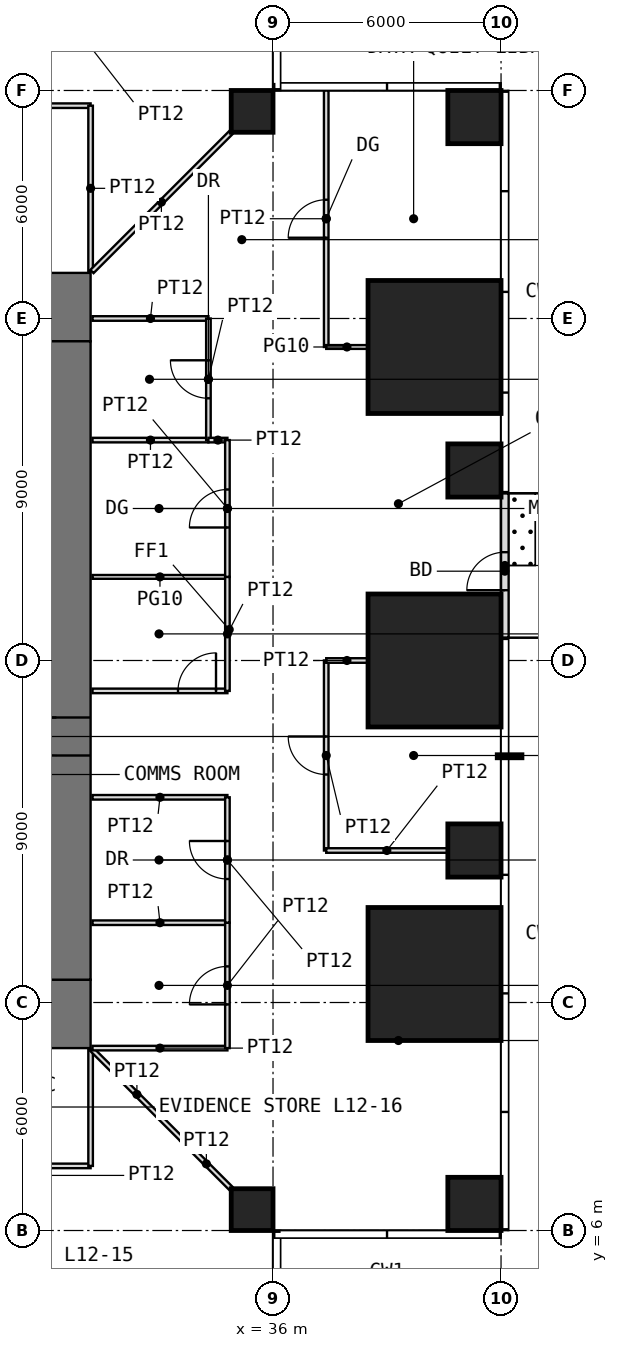
"""IFC4 building model, lengths in metres.
Left out: names, types, materials, properties, quantities, classifications, styles, units other than length and angle.
Written with IfcOpenShell. Run it as: python <this file> out.ifc"""

import sys

from ifc_helpers import new_model, si_unit, direction, frame, frame_2d, origin, origin_2d, place, context, subcontext, project, spatial, rectangle, extrude, element, fill, save


model = new_model("IFC4")
c1 = context("Model", 3, precision=1e-05, world=origin(), true_north=direction((0.0, 1.0)))
c2 = subcontext(c1, "Body", "Model", "MODEL_VIEW")
j1 = project(units=[si_unit("LENGTHUNIT", "METRE"), si_unit("PLANEANGLEUNIT", "RADIAN")], contexts=[c1])
p1 = place(None, origin())
s1 = spatial("IfcSite", under=j1, at=p1, CompositionType="ELEMENT")
p2 = place(p1, origin())
s2 = spatial("IfcBuilding", under=s1, at=p2, CompositionType="ELEMENT")
p3 = place(p2, frame((0.0, 0.0, 54.5)))
s3 = spatial("IfcBuildingStorey", under=s2, at=p3, CompositionType="ELEMENT", Elevation=54.5)
p4 = place(p3, frame((35.45, 6.55, 0.0), z_axis=(0.0, 0.0, 1.0), x_axis=(1.0, 0.0, 0.0)))
e1 = element("IfcColumn", 1, at=p4, inside=s3, PredefinedType="COLUMN", context=c2, shape_type="SweptSolid", body=[
    extrude(rectangle(XDim=1.1, YDim=1.1, at=origin_2d()), origin(), (0.0, 0.0, 1.0), 4.0),
])
p5 = place(p3, frame((41.3, 6.7, 0.0), z_axis=(0.0, 0.0, 1.0), x_axis=(1.0, 0.0, 0.0)))
e2 = element("IfcColumn", 2, at=p5, inside=s3, PredefinedType="COLUMN", context=c2, shape_type="SweptSolid", body=[
    extrude(rectangle(XDim=1.4, YDim=1.4, at=origin_2d()), origin(), (0.0, 0.0, 1.0), 4.0),
])
p6 = place(p3, frame((40.25, 12.75, 0.0), z_axis=(0.0, 0.0, 1.0), x_axis=(1.0, 0.0, 0.0)))
e3 = element("IfcColumn", 3, at=p6, inside=s3, PredefinedType="COLUMN", context=c2, shape_type="SweptSolid", body=[
    extrude(rectangle(XDim=3.5, YDim=3.5, at=origin_2d()), origin(), (0.0, 0.0, 1.0), 4.0),
])
p7 = place(p3, frame((41.3, 16.0, 0.0), z_axis=(0.0, 0.0, 1.0), x_axis=(1.0, 0.0, 0.0)))
e4 = element("IfcColumn", 4, at=p7, inside=s3, PredefinedType="COLUMN", context=c2, shape_type="SweptSolid", body=[
    extrude(rectangle(XDim=1.4, YDim=1.4, at=origin_2d()), origin(), (0.0, 0.0, 1.0), 4.0),
])
p8 = place(p3, frame((40.25, 21.0, 0.0), z_axis=(0.0, 0.0, 1.0), x_axis=(1.0, 0.0, 0.0)))
e5 = element("IfcColumn", 5, at=p8, inside=s3, PredefinedType="COLUMN", context=c2, shape_type="SweptSolid", body=[
    extrude(rectangle(XDim=3.5, YDim=3.5, at=origin_2d()), origin(), (0.0, 0.0, 1.0), 4.0),
])
p9 = place(p3, frame((41.3, 26.0, 0.0), z_axis=(0.0, 0.0, 1.0), x_axis=(1.0, 0.0, 0.0)))
e6 = element("IfcColumn", 6, at=p9, inside=s3, PredefinedType="COLUMN", context=c2, shape_type="SweptSolid", body=[
    extrude(rectangle(XDim=1.4, YDim=1.4, at=origin_2d()), origin(), (0.0, 0.0, 1.0), 4.0),
])
p10 = place(p3, frame((40.25, 29.25, 0.0), z_axis=(0.0, 0.0, 1.0), x_axis=(1.0, 0.0, 0.0)))
e7 = element("IfcColumn", 7, at=p10, inside=s3, PredefinedType="COLUMN", context=c2, shape_type="SweptSolid", body=[
    extrude(rectangle(XDim=3.5, YDim=3.5, at=origin_2d()), origin(), (0.0, 0.0, 1.0), 4.0),
])
p11 = place(p3, frame((35.45, 35.45, 0.0), z_axis=(0.0, 0.0, 1.0), x_axis=(1.0, 0.0, 0.0)))
e8 = element("IfcColumn", 8, at=p11, inside=s3, PredefinedType="COLUMN", context=c2, shape_type="SweptSolid", body=[
    extrude(rectangle(XDim=1.1, YDim=1.1, at=origin_2d()), origin(), (0.0, 0.0, 1.0), 4.0),
])
p12 = place(p3, frame((41.3, 35.3, 0.0), z_axis=(0.0, 0.0, 1.0), x_axis=(1.0, 0.0, 0.0)))
e9 = element("IfcColumn", 9, at=p12, inside=s3, PredefinedType="COLUMN", context=c2, shape_type="SweptSolid", body=[
    extrude(rectangle(XDim=1.4, YDim=1.4, at=origin_2d()), origin(), (0.0, 0.0, 1.0), 4.0),
])
p13 = place(p3, frame((42.1, 21.6, 0.0), z_axis=(0.0, 0.0, 1.0), x_axis=(0.0, 1.0, 0.0)))
e10 = element("IfcWall", 10, at=p13, inside=s3, PredefinedType="USERDEFINED", context=c2, shape_type="SweptSolid", body=[
    extrude(rectangle(XDim=3.8, YDim=0.2, at=frame_2d((1.9, 0.0))), origin(), (0.0, 0.0, 1.0), 3.75),
])
p14 = place(p13, frame((1.25, 0.0, 0.0)))
e11 = element("IfcOpeningElement", 11, at=p14, cuts=e10, PredefinedType="OPENING", context=c2, shape_type="SweptSolid", body=[
    extrude(rectangle(XDim=1.0, YDim=2.4, at=frame_2d((0.5, 1.2))), frame((0.0, 0.11, 0.0), z_axis=(0.0, -1.0, 0.0), x_axis=(1.0, 0.0, 0.0)), (0.0, 0.0, 1.0), 0.22),
])
p15 = place(p3, frame((10.8, 11.7, -0.05), z_axis=(0.0, 0.0, 1.0), x_axis=(1.0, 0.0, 0.0)))
e12 = element("IfcWall", 12, at=p15, inside=s3, PredefinedType="SHEAR", context=c2, shape_type="SweptSolid", body=[
    extrude(rectangle(XDim=20.4, YDim=1.8, at=frame_2d((10.2, 0.0))), origin(), (0.0, 0.0, 1.0), 4.0),
])
p16 = place(p15, frame((9.2, 0.0, 0.05)))
e13 = element("IfcOpeningElement", 13, at=p16, cuts=e12, PredefinedType="OPENING", context=c2, shape_type="SweptSolid", body=[
    extrude(rectangle(XDim=2.0, YDim=2.2, at=frame_2d((1.0, 1.1))), frame((0.0, 0.91, 0.0), z_axis=(0.0, -1.0, 0.0), x_axis=(1.0, 0.0, 0.0)), (0.0, 0.0, 1.0), 1.82),
])
p17 = place(p3, frame((10.8, 30.3, -0.05), z_axis=(0.0, 0.0, 1.0), x_axis=(1.0, 0.0, 0.0)))
e14 = element("IfcWall", 14, at=p17, inside=s3, PredefinedType="SHEAR", context=c2, shape_type="SweptSolid", body=[
    extrude(rectangle(XDim=20.4, YDim=1.8, at=frame_2d((10.2, 0.0))), origin(), (0.0, 0.0, 1.0), 4.0),
])
p18 = place(p17, frame((9.2, 0.0, 0.05)))
e15 = element("IfcOpeningElement", 15, at=p18, cuts=e14, PredefinedType="OPENING", context=c2, shape_type="SweptSolid", body=[
    extrude(rectangle(XDim=2.0, YDim=2.2, at=frame_2d((1.0, 1.1))), frame((0.0, 0.91, 0.0), z_axis=(0.0, -1.0, 0.0), x_axis=(1.0, 0.0, 0.0)), (0.0, 0.0, 1.0), 1.82),
])
p19 = place(p3, frame((30.3, 12.6, -0.05), z_axis=(0.0, 0.0, 1.0), x_axis=(0.0, 1.0, 0.0)))
e16 = element("IfcWall", 16, at=p19, inside=s3, PredefinedType="SHEAR", context=c2, shape_type="SweptSolid", body=[
    extrude(rectangle(XDim=16.8, YDim=1.8, at=frame_2d((8.4, 0.0))), origin(), (0.0, 0.0, 1.0), 4.0),
])
p20 = place(p19, frame((5.9, 0.0, 0.05)))
e17 = element("IfcOpeningElement", 17, at=p20, cuts=e16, PredefinedType="OPENING", context=c2, shape_type="SweptSolid", body=[
    extrude(rectangle(XDim=1.0, YDim=2.2, at=frame_2d((0.5, 1.1))), frame((0.0, 0.91, 0.0), z_axis=(0.0, -1.0, 0.0), x_axis=(1.0, 0.0, 0.0)), (0.0, 0.0, 1.0), 1.82),
])
p21 = place(p3, frame((23.6, 35.6, 0.0), z_axis=(0.0, 0.0, 1.0), x_axis=(1.0, 0.0, 0.0)))
e18 = element("IfcWall", 18, at=p21, inside=s3, PredefinedType="PARTITIONING", context=c2, shape_type="SweptSolid", body=[
    extrude(rectangle(XDim=7.6, YDim=0.12, at=frame_2d((3.8, 0.0))), origin(), (0.0, 0.0, 1.0), 3.75),
])
p22 = place(p21, frame((3.3, 0.0, 0.0)))
e19 = element("IfcOpeningElement", 19, at=p22, cuts=e18, PredefinedType="OPENING", context=c2, shape_type="SweptSolid", body=[
    extrude(rectangle(XDim=1.0, YDim=2.4, at=frame_2d((0.5, 1.2))), frame((0.0, 0.07, 0.0), z_axis=(0.0, -1.0, 0.0), x_axis=(1.0, 0.0, 0.0)), (0.0, 0.0, 1.0), 0.14),
])
p23 = place(p3, frame((27.6, 7.7, 0.0), z_axis=(0.0, 0.0, 1.0), x_axis=(1.0, 0.0, 0.0)))
e20 = element("IfcWall", 20, at=p23, inside=s3, PredefinedType="PARTITIONING", context=c2, shape_type="SweptSolid", body=[
    extrude(rectangle(XDim=3.6, YDim=0.12, at=frame_2d((1.8, 0.0))), origin(), (0.0, 0.0, 1.0), 3.75),
])
p24 = place(p23, frame((1.3, 0.0, 0.0)))
e21 = element("IfcOpeningElement", 21, at=p24, cuts=e20, PredefinedType="OPENING", context=c2, shape_type="SweptSolid", body=[
    extrude(rectangle(XDim=1.0, YDim=2.2, at=frame_2d((0.5, 1.1))), frame((0.0, 0.07, 0.0), z_axis=(0.0, -1.0, 0.0), x_axis=(1.0, 0.0, 0.0)), (0.0, 0.0, 1.0), 0.14),
])
p25 = place(p3, frame((31.2, 7.7, 0.0), z_axis=(0.0, 0.0, 1.0), x_axis=(0.0, 1.0, 0.0)))
e22 = element("IfcWall", 22, at=p25, inside=s3, PredefinedType="PARTITIONING", context=c2, shape_type="SweptSolid", body=[
    extrude(rectangle(XDim=3.05, YDim=0.12, at=frame_2d((1.525, 0.0))), origin(), (0.0, 0.0, 1.0), 3.75),
])
p26 = place(p3, frame((31.2, 31.25, 0.0), z_axis=(0.0, 0.0, 1.0), x_axis=(0.0, 1.0, 0.0)))
e23 = element("IfcWall", 23, at=p26, inside=s3, PredefinedType="PARTITIONING", context=c2, shape_type="SweptSolid", body=[
    extrude(rectangle(XDim=4.35, YDim=0.12, at=frame_2d((2.175, 0.0))), origin(), (0.0, 0.0, 1.0), 3.75),
])
p27 = place(p3, frame((31.235, 10.765, 0.0), z_axis=(0.0, 0.0, 1.0), x_axis=(0.707106781187, -0.707106781187, 0.0)))
e24 = element("IfcWall", 24, at=p27, inside=s3, PredefinedType="PARTITIONING", context=c2, shape_type="SweptSolid", body=[
    extrude(rectangle(XDim=3.346, YDim=0.12, at=frame_2d((1.673, 0.0))), origin(), (0.0, 0.0, 1.0), 3.75),
])
p28 = place(p3, frame((31.235, 31.235, 0.0), z_axis=(0.0, 0.0, 1.0), x_axis=(0.707106781187, 0.707106781187, 0.0)))
e25 = element("IfcWall", 25, at=p28, inside=s3, PredefinedType="PARTITIONING", context=c2, shape_type="SweptSolid", body=[
    extrude(rectangle(XDim=5.168, YDim=0.12, at=frame_2d((2.584, 0.0))), origin(), (0.0, 0.0, 1.0), 3.75),
])
for number, where, z_axis, x_axis in (
    (26, (31.25, 10.8, 0.0), (0.0, 0.0, 1.0), (1.0, 0.0, 0.0)),
    (27, (31.25, 14.1, 0.0), (0.0, 0.0, 1.0), (1.0, 0.0, 0.0)),
    (28, (31.25, 17.4, 0.0), (0.0, 0.0, 1.0), (1.0, 0.0, 0.0)),
):
    element("IfcWall", number, at=place(p3, frame(where, z_axis=z_axis, x_axis=x_axis)), inside=s3, PredefinedType="PARTITIONING", context=c2, shape_type="SweptSolid", body=[
        extrude(rectangle(XDim=3.55, YDim=0.12, at=frame_2d((1.775, 0.0))), origin(), (0.0, 0.0, 1.0), 3.75),
    ])
p29 = place(p3, frame((31.25, 20.2, 0.0), z_axis=(0.0, 0.0, 1.0), x_axis=(1.0, 0.0, 0.0)))
e29 = element("IfcWall", 29, at=p29, inside=s3, PredefinedType="PARTITIONING", context=c2, shape_type="SweptSolid", body=[
    extrude(rectangle(XDim=3.55, YDim=0.12, at=frame_2d((1.775, 0.0))), origin(), (0.0, 0.0, 1.0), 3.75),
])
p30 = place(p29, frame((2.25, 0.0, 0.0)))
e30 = element("IfcOpeningElement", 30, at=p30, cuts=e29, PredefinedType="OPENING", context=c2, shape_type="SweptSolid", body=[
    extrude(rectangle(XDim=1.0, YDim=2.4, at=frame_2d((0.5, 1.2))), frame((0.0, 0.07, 0.0), z_axis=(0.0, -1.0, 0.0), x_axis=(1.0, 0.0, 0.0)), (0.0, 0.0, 1.0), 0.14),
])
p31 = place(p3, frame((31.25, 23.2, 0.0), z_axis=(0.0, 0.0, 1.0), x_axis=(1.0, 0.0, 0.0)))
e31 = element("IfcWall", 31, at=p31, inside=s3, PredefinedType="PARTITIONING", context=c2, shape_type="SweptSolid", body=[
    extrude(rectangle(XDim=3.55, YDim=0.1, at=frame_2d((1.775, 0.0))), origin(), (0.0, 0.0, 1.0), 3.75),
])
for number, where, z_axis, x_axis in (
    (32, (31.25, 26.8, 0.0), (0.0, 0.0, 1.0), (1.0, 0.0, 0.0)),
    (33, (31.25, 30.0, 0.0), (0.0, 0.0, 1.0), (1.0, 0.0, 0.0)),
):
    element("IfcWall", number, at=place(p3, frame(where, z_axis=z_axis, x_axis=x_axis)), inside=s3, PredefinedType="PARTITIONING", context=c2, shape_type="SweptSolid", body=[
        extrude(rectangle(XDim=3.05, YDim=0.12, at=frame_2d((1.525, 0.0))), origin(), (0.0, 0.0, 1.0), 3.75),
    ])
p32 = place(p3, frame((33.602, 8.398, 0.0), z_axis=(0.0, 0.0, 1.0), x_axis=(0.707106781187, -0.707106781187, 0.0)))
e34 = element("IfcWall", 34, at=p32, inside=s3, PredefinedType="PARTITIONING", context=c2, shape_type="SweptSolid", body=[
    extrude(rectangle(XDim=1.822, YDim=0.12, at=frame_2d((0.911, 0.0))), origin(), (0.0, 0.0, 1.0), 3.75),
])
p33 = place(p3, frame((34.3, 26.8, 0.0), z_axis=(0.0, 0.0, 1.0), x_axis=(0.0, 1.0, 0.0)))
e35 = element("IfcWall", 35, at=p33, inside=s3, PredefinedType="PARTITIONING", context=c2, shape_type="SweptSolid", body=[
    extrude(rectangle(XDim=3.2, YDim=0.12, at=frame_2d((1.6, 0.0))), origin(), (0.0, 0.0, 1.0), 3.75),
])
p34 = place(p33, frame((1.1, 0.0, 0.0)))
e36 = element("IfcOpeningElement", 36, at=p34, cuts=e35, PredefinedType="OPENING", context=c2, shape_type="SweptSolid", body=[
    extrude(rectangle(XDim=1.0, YDim=2.2, at=frame_2d((0.5, 1.1))), frame((0.0, 0.07, 0.0), z_axis=(0.0, -1.0, 0.0), x_axis=(1.0, 0.0, 0.0)), (0.0, 0.0, 1.0), 0.14),
])
p35 = place(p3, frame((34.3, 26.8, 0.0), z_axis=(0.0, 0.0, 1.0), x_axis=(1.0, 0.0, 0.0)))
e37 = element("IfcWall", 37, at=p35, inside=s3, PredefinedType="PARTITIONING", context=c2, shape_type="SweptSolid", body=[
    extrude(rectangle(XDim=0.5, YDim=0.12, at=frame_2d((0.25, 0.0))), origin(), (0.0, 0.0, 1.0), 3.75),
])
p36 = place(p3, frame((34.8, 10.8, 0.0), z_axis=(0.0, 0.0, 1.0), x_axis=(0.0, 1.0, 0.0)))
e38 = element("IfcWall", 38, at=p36, inside=s3, PredefinedType="PARTITIONING", context=c2, shape_type="SweptSolid", body=[
    extrude(rectangle(XDim=3.3, YDim=0.12, at=frame_2d((1.65, 0.0))), origin(), (0.0, 0.0, 1.0), 3.75),
])
p37 = place(p36, frame((1.15, 0.0, 0.0)))
e39 = element("IfcOpeningElement", 39, at=p37, cuts=e38, PredefinedType="OPENING", context=c2, shape_type="SweptSolid", body=[
    extrude(rectangle(XDim=1.0, YDim=2.2, at=frame_2d((0.5, 1.1))), frame((0.0, 0.07, 0.0), z_axis=(0.0, -1.0, 0.0), x_axis=(1.0, 0.0, 0.0)), (0.0, 0.0, 1.0), 0.14),
])
p38 = place(p3, frame((34.8, 14.1, 0.0), z_axis=(0.0, 0.0, 1.0), x_axis=(0.0, 1.0, 0.0)))
e40 = element("IfcWall", 40, at=p38, inside=s3, PredefinedType="PARTITIONING", context=c2, shape_type="SweptSolid", body=[
    extrude(rectangle(XDim=3.3, YDim=0.12, at=frame_2d((1.65, 0.0))), origin(), (0.0, 0.0, 1.0), 3.75),
])
p39 = place(p38, frame((1.15, 0.0, 0.0)))
e41 = element("IfcOpeningElement", 41, at=p39, cuts=e40, PredefinedType="OPENING", context=c2, shape_type="SweptSolid", body=[
    extrude(rectangle(XDim=1.0, YDim=2.2, at=frame_2d((0.5, 1.1))), frame((0.0, 0.07, 0.0), z_axis=(0.0, -1.0, 0.0), x_axis=(1.0, 0.0, 0.0)), (0.0, 0.0, 1.0), 0.14),
])
p40 = place(p3, frame((34.8, 20.2, 0.0), z_axis=(0.0, 0.0, 1.0), x_axis=(0.0, 1.0, 0.0)))
e42 = element("IfcWall", 42, at=p40, inside=s3, PredefinedType="PARTITIONING", context=c2, shape_type="SweptSolid", body=[
    extrude(rectangle(XDim=3.0, YDim=0.12, at=frame_2d((1.5, 0.0))), origin(), (0.0, 0.0, 1.0), 3.75),
])
p41 = place(p3, frame((34.8, 23.2, 0.0), z_axis=(0.0, 0.0, 1.0), x_axis=(0.0, 1.0, 0.0)))
e43 = element("IfcWall", 43, at=p41, inside=s3, PredefinedType="PARTITIONING", context=c2, shape_type="SweptSolid", body=[
    extrude(rectangle(XDim=3.6, YDim=0.12, at=frame_2d((1.8, 0.0))), origin(), (0.0, 0.0, 1.0), 3.75),
])
p42 = place(p41, frame((1.3, 0.0, 0.0)))
e44 = element("IfcOpeningElement", 44, at=p42, cuts=e43, PredefinedType="OPENING", context=c2, shape_type="SweptSolid", body=[
    extrude(rectangle(XDim=1.0, YDim=2.4, at=frame_2d((0.5, 1.2))), frame((0.0, 0.07, 0.0), z_axis=(0.0, -1.0, 0.0), x_axis=(1.0, 0.0, 0.0)), (0.0, 0.0, 1.0), 0.14),
])
p43 = place(p3, frame((37.4, 16.0, 0.0), z_axis=(0.0, 0.0, 1.0), x_axis=(0.0, 1.0, 0.0)))
e45 = element("IfcWall", 45, at=p43, inside=s3, PredefinedType="PARTITIONING", context=c2, shape_type="SweptSolid", body=[
    extrude(rectangle(XDim=5.0, YDim=0.12, at=frame_2d((2.5, 0.0))), origin(), (0.0, 0.0, 1.0), 3.75),
])
p44 = place(p43, frame((2.0, 0.0, 0.0)))
e46 = element("IfcOpeningElement", 46, at=p44, cuts=e45, PredefinedType="OPENING", context=c2, shape_type="SweptSolid", body=[
    extrude(rectangle(XDim=1.0, YDim=2.2, at=frame_2d((0.5, 1.1))), frame((0.0, 0.07, 0.0), z_axis=(0.0, -1.0, 0.0), x_axis=(1.0, 0.0, 0.0)), (0.0, 0.0, 1.0), 0.14),
])
p45 = place(p3, frame((37.4, 16.0, 0.0), z_axis=(0.0, 0.0, 1.0), x_axis=(1.0, 0.0, 0.0)))
e47 = element("IfcWall", 47, at=p45, inside=s3, PredefinedType="PARTITIONING", context=c2, shape_type="SweptSolid", body=[
    extrude(rectangle(XDim=3.19, YDim=0.12, at=frame_2d((1.595, 0.0))), origin(), (0.0, 0.0, 1.0), 3.75),
])
p46 = place(p3, frame((37.4, 21.0, 0.0), z_axis=(0.0, 0.0, 1.0), x_axis=(1.0, 0.0, 0.0)))
e48 = element("IfcWall", 48, at=p46, inside=s3, PredefinedType="PARTITIONING", context=c2, shape_type="SweptSolid", body=[
    extrude(rectangle(XDim=1.09, YDim=0.12, at=frame_2d((0.545, 0.0))), origin(), (0.0, 0.0, 1.0), 3.75),
])
p47 = place(p3, frame((37.4, 29.25, 0.0), z_axis=(0.0, 0.0, 1.0), x_axis=(0.0, 1.0, 0.0)))
e49 = element("IfcWall", 49, at=p47, inside=s3, PredefinedType="PARTITIONING", context=c2, shape_type="SweptSolid", body=[
    extrude(rectangle(XDim=6.75, YDim=0.12, at=frame_2d((3.375, 0.0))), origin(), (0.0, 0.0, 1.0), 3.75),
])
p48 = place(p47, frame((2.875, 0.0, 0.0)))
e50 = element("IfcOpeningElement", 50, at=p48, cuts=e49, PredefinedType="OPENING", context=c2, shape_type="SweptSolid", body=[
    extrude(rectangle(XDim=1.0, YDim=2.4, at=frame_2d((0.5, 1.2))), frame((0.0, 0.07, 0.0), z_axis=(0.0, -1.0, 0.0), x_axis=(1.0, 0.0, 0.0)), (0.0, 0.0, 1.0), 0.14),
])
p49 = place(p3, frame((37.4, 29.25, 0.0), z_axis=(0.0, 0.0, 1.0), x_axis=(1.0, 0.0, 0.0)))
e51 = element("IfcWall", 51, at=p49, inside=s3, PredefinedType="PARTITIONING", context=c2, shape_type="SweptSolid", body=[
    extrude(rectangle(XDim=1.09, YDim=0.1, at=frame_2d((0.545, 0.0))), origin(), (0.0, 0.0, 1.0), 3.75),
])
p50 = place(p14, origin())
e52 = element("IfcDoor", 52, at=p50, inside=s3, OperationType="SINGLE_SWING_LEFT", PredefinedType="DOOR", context=c2, shape_type="SweptSolid", body=[
    extrude(rectangle(XDim=1.0, YDim=2.4, at=frame_2d((0.5, 1.2))), frame((0.0, 0.025, 0.0), z_axis=(0.0, -1.0, 0.0), x_axis=(1.0, 0.0, 0.0)), (0.0, 0.0, 1.0), 0.05),
])
fill(e11, e52)
p51 = place(p20, origin())
e53 = element("IfcDoor", 53, at=p51, inside=s3, OperationType="SINGLE_SWING_RIGHT", PredefinedType="DOOR", context=c2, shape_type="SweptSolid", body=[
    extrude(rectangle(XDim=1.0, YDim=2.2, at=frame_2d((0.5, 1.1))), frame((0.0, 0.025, 0.0), z_axis=(0.0, -1.0, 0.0), x_axis=(1.0, 0.0, 0.0)), (0.0, 0.0, 1.0), 0.05),
])
fill(e17, e53)
p52 = place(p37, origin())
e54 = element("IfcDoor", 54, at=p52, inside=s3, OperationType="SINGLE_SWING_LEFT", PredefinedType="DOOR", context=c2, shape_type="SweptSolid", body=[
    extrude(rectangle(XDim=1.0, YDim=2.2, at=frame_2d((0.5, 1.1))), frame((0.0, 0.025, 0.0), z_axis=(0.0, -1.0, 0.0), x_axis=(1.0, 0.0, 0.0)), (0.0, 0.0, 1.0), 0.05),
])
fill(e39, e54)
p53 = place(p39, origin())
e55 = element("IfcDoor", 55, at=p53, inside=s3, OperationType="SINGLE_SWING_RIGHT", PredefinedType="DOOR", context=c2, shape_type="SweptSolid", body=[
    extrude(rectangle(XDim=1.0, YDim=2.2, at=frame_2d((0.5, 1.1))), frame((0.0, 0.025, 0.0), z_axis=(0.0, -1.0, 0.0), x_axis=(1.0, 0.0, 0.0)), (0.0, 0.0, 1.0), 0.05),
])
fill(e41, e55)
p54 = place(p42, origin())
e56 = element("IfcDoor", 56, at=p54, inside=s3, OperationType="SINGLE_SWING_LEFT", PredefinedType="DOOR", context=c2, shape_type="SweptSolid", body=[
    extrude(rectangle(XDim=1.0, YDim=2.4, at=frame_2d((0.5, 1.2))), frame((0.0, 0.025, 0.0), z_axis=(0.0, -1.0, 0.0), x_axis=(1.0, 0.0, 0.0)), (0.0, 0.0, 1.0), 0.05),
])
fill(e44, e56)
p55 = place(p34, origin())
e57 = element("IfcDoor", 57, at=p55, inside=s3, OperationType="SINGLE_SWING_RIGHT", PredefinedType="DOOR", context=c2, shape_type="SweptSolid", body=[
    extrude(rectangle(XDim=1.0, YDim=2.2, at=frame_2d((0.5, 1.1))), frame((0.0, 0.025, 0.0), z_axis=(0.0, -1.0, 0.0), x_axis=(1.0, 0.0, 0.0)), (0.0, 0.0, 1.0), 0.05),
])
fill(e36, e57)
p56 = place(p44, origin())
e58 = element("IfcDoor", 58, at=p56, inside=s3, OperationType="SINGLE_SWING_RIGHT", PredefinedType="DOOR", context=c2, shape_type="SweptSolid", body=[
    extrude(rectangle(XDim=1.0, YDim=2.2, at=frame_2d((0.5, 1.1))), frame((0.0, 0.025, 0.0), z_axis=(0.0, -1.0, 0.0), x_axis=(1.0, 0.0, 0.0)), (0.0, 0.0, 1.0), 0.05),
])
fill(e46, e58)
p57 = place(p48, origin())
e59 = element("IfcDoor", 59, at=p57, inside=s3, OperationType="SINGLE_SWING_LEFT", PredefinedType="DOOR", context=c2, shape_type="SweptSolid", body=[
    extrude(rectangle(XDim=1.0, YDim=2.4, at=frame_2d((0.5, 1.2))), frame((0.0, 0.025, 0.0), z_axis=(0.0, -1.0, 0.0), x_axis=(1.0, 0.0, 0.0)), (0.0, 0.0, 1.0), 0.05),
])
fill(e50, e59)
p58 = place(p30, origin())
e60 = element("IfcDoor", 60, at=p58, inside=s3, OperationType="SINGLE_SWING_RIGHT", PredefinedType="DOOR", context=c2, shape_type="SweptSolid", body=[
    extrude(rectangle(XDim=1.0, YDim=2.4, at=frame_2d((0.5, 1.2))), frame((0.0, 0.025, 0.0), z_axis=(0.0, -1.0, 0.0), x_axis=(1.0, 0.0, 0.0)), (0.0, 0.0, 1.0), 0.05),
])
fill(e30, e60)
save(model, sys.argv[1])
